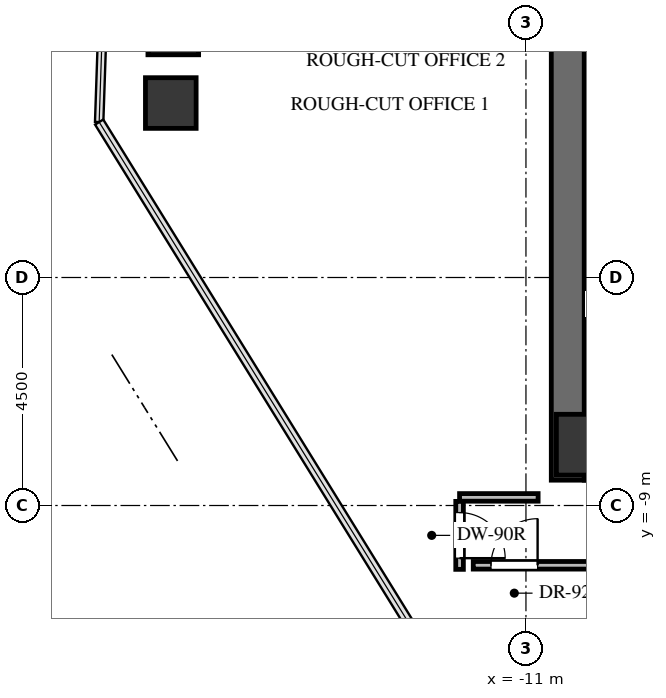
"""IFC4 building model, lengths in metres.
Left out: names, types, materials, properties, quantities, classifications, styles, units other than length and angle.
Written with IfcOpenShell. Run it as: python <this file> out.ifc"""

import sys

from ifc_helpers import new_model, si_unit, direction, frame, frame_2d, origin, origin_2d, place, context, subcontext, project, spatial, rectangle, extrude, source, transform, mapped, element, fill, save


model = new_model("IFC4")
c1 = context("Model", 3, precision=1e-05, world=origin(), true_north=direction((0.0, 1.0)))
c2 = subcontext(c1, "Body", "Model", "MODEL_VIEW")
j1 = project(units=[si_unit("LENGTHUNIT", "METRE"), si_unit("PLANEANGLEUNIT", "RADIAN")], contexts=[c1])
p1 = place(None, origin())
s1 = spatial("IfcSite", under=j1, at=p1, CompositionType="ELEMENT")
p2 = place(p1, origin())
s2 = spatial("IfcBuilding", under=s1, at=p2, CompositionType="ELEMENT")
p3 = place(p2, frame((0.0, 0.0, 173.8)))
s3 = spatial("IfcBuildingStorey", under=s2, at=p3, CompositionType="ELEMENT", Elevation=173.8)
p4 = place(p3, frame((-10.175, -8.5, 0.0), z_axis=(0.0, 0.0, 1.0), x_axis=(0.0, 1.0, 0.0)))
e1 = element("IfcWall", 1, at=p4, inside=s3, PredefinedType="SHEAR", context=c2, shape_type="SweptSolid", body=[
    extrude(rectangle(XDim=17.0, YDim=0.65, at=frame_2d((8.5, 0.0))), origin(), (0.0, 0.0, 1.0), 3.3),
])
p5 = place(p3, frame((-9.85, -8.175, 0.0), z_axis=(0.0, 0.0, 1.0), x_axis=(1.0, 0.0, 0.0)))
e2 = element("IfcWall", 2, at=p5, inside=s3, PredefinedType="SHEAR", context=c2, shape_type="SweptSolid", body=[
    extrude(rectangle(XDim=7.75, YDim=0.65, at=frame_2d((3.875, 0.0))), origin(), (0.0, 0.0, 1.0), 3.3),
])
m1 = source(origin(), c2, "Body", "SweptSolid", [
    extrude(rectangle(XDim=1.2, YDim=1.2, at=origin_2d()), origin(), (0.0, 0.0, 1.0), 3.3),
])
p6 = place(p3, frame((-9.8, -7.8, -0.24), z_axis=(0.0, 0.0, 1.0), x_axis=(1.0, 0.0, 0.0)))
e3 = element("IfcColumn", 3, at=p6, inside=s3, PredefinedType="COLUMN", context=c2, shape_type="MappedRepresentation", body=[
    mapped(m1, transform((0.0, 0.0, 0.0), x_axis=(1.0, 0.0, 0.0), y_axis=(0.0, 1.0, 0.0), z_axis=(0.0, 0.0, 1.0), scale=1.0)),
])
m2 = source(origin(), c2, "Body", "SweptSolid", [
    extrude(rectangle(XDim=1.0, YDim=1.0, at=origin_2d()), origin(), (0.0, 0.0, 1.0), 3.3),
])
for number, where, z_axis, x_axis in (
    (4, (-18.009, -1.057, -0.24), (0.0, 0.0, 1.0), (1.0, 0.0, 0.0)),
    (5, (-17.96, 0.396, -0.24), (0.0, 0.0, 1.0), (1.0, 0.0, 0.0)),
):
    element("IfcColumn", number, at=place(p3, frame(where, z_axis=z_axis, x_axis=x_axis)), inside=s3, PredefinedType="COLUMN", context=c2, shape_type="MappedRepresentation", body=[
        mapped(m2, transform((0.0, 0.0, 0.0), x_axis=(1.0, 0.0, 0.0), y_axis=(0.0, 1.0, 0.0), z_axis=(0.0, 0.0, 1.0), scale=1.0)),
    ])
p7 = place(p3, frame((-12.04, -10.18, 0.0), z_axis=(0.0, 0.0, 1.0), x_axis=(1.0, 0.0, 0.0)))
e6 = element("IfcWall", 6, at=p7, inside=s3, PredefinedType="PARTITIONING", context=c2, shape_type="SweptSolid", body=[
    extrude(rectangle(XDim=5.58, YDim=0.15, at=frame_2d((2.79, 0.0))), origin(), (0.0, 0.0, 1.0), 3.045),
])
p8 = place(p7, frame((0.35, 0.0, 0.0)))
e7 = element("IfcOpeningElement", 7, at=p8, cuts=e6, PredefinedType="OPENING", context=c2, shape_type="SweptSolid", body=[
    extrude(rectangle(XDim=0.92, YDim=2.1, at=frame_2d((0.46, 1.05))), frame((0.0, 0.085, 0.0), z_axis=(0.0, -1.0, 0.0), x_axis=(1.0, 0.0, 0.0)), (0.0, 0.0, 1.0), 0.17),
])
p9 = place(p3, frame((-10.76, -8.84, 0.0), z_axis=(0.0, 0.0, 1.0), x_axis=(-1.0, 0.0, 0.0)))
e8 = element("IfcWall", 8, at=p9, inside=s3, PredefinedType="PARTITIONING", context=c2, shape_type="SweptSolid", body=[
    extrude(rectangle(XDim=1.55, YDim=0.15, at=frame_2d((0.775, 0.0))), origin(), (0.0, 0.0, 1.0), 3.045),
])
p10 = place(p3, frame((-12.31, -8.919, 0.0), z_axis=(0.0, 0.0, 1.0), x_axis=(0.0, -1.0, 0.0)))
e9 = element("IfcWall", 9, at=p10, inside=s3, PredefinedType="PARTITIONING", context=c2, shape_type="SweptSolid", body=[
    extrude(rectangle(XDim=1.341, YDim=0.15, at=frame_2d((0.67, 0.0))), origin(), (0.0, 0.0, 1.0), 2.399),
])
p11 = place(p10, frame((0.22, 0.0, 0.0)))
e10 = element("IfcOpeningElement", 10, at=p11, cuts=e9, PredefinedType="OPENING", context=c2, shape_type="SweptSolid", body=[
    extrude(rectangle(XDim=0.9, YDim=2.05, at=frame_2d((0.45, 1.025))), frame((0.0, 0.085, 0.0), z_axis=(0.0, -1.0, 0.0), x_axis=(1.0, 0.0, 0.0)), (0.0, 0.0, 1.0), 0.17),
])
m3 = source(origin(), c2, "Body", "SweptSolid", [
    extrude(rectangle(XDim=0.92, YDim=2.1, at=frame_2d((0.46, 1.05))), frame((0.0, 0.025, 0.0), z_axis=(0.0, -1.0, 0.0), x_axis=(1.0, 0.0, 0.0)), (0.0, 0.0, 1.0), 0.05),
])
p12 = place(p8, origin())
e11 = element("IfcDoor", 11, at=p12, inside=s3, OperationType="SINGLE_SWING_RIGHT", PredefinedType="DOOR", context=c2, shape_type="MappedRepresentation", body=[
    mapped(m3, transform((0.0, 0.0, 0.0), x_axis=(1.0, 0.0, 0.0), y_axis=(0.0, 1.0, 0.0), z_axis=(0.0, 0.0, 1.0), scale=1.0)),
])
fill(e7, e11)
m4 = source(origin(), c2, "Body", "SweptSolid", [
    extrude(rectangle(XDim=0.9, YDim=2.05, at=frame_2d((0.45, 1.025))), frame((0.0, 0.025, 0.0), z_axis=(0.0, -1.0, 0.0), x_axis=(1.0, 0.0, 0.0)), (0.0, 0.0, 1.0), 0.05),
])
p13 = place(p11, origin())
e12 = element("IfcDoor", 12, at=p13, inside=s3, OperationType="SINGLE_SWING_RIGHT", PredefinedType="DOOR", context=c2, shape_type="MappedRepresentation", body=[
    mapped(m4, transform((0.0, 0.0, 0.0), x_axis=(1.0, 0.0, 0.0), y_axis=(0.0, 1.0, 0.0), z_axis=(0.0, 0.0, 1.0), scale=1.0)),
])
fill(e10, e12)
save(model, sys.argv[1])
